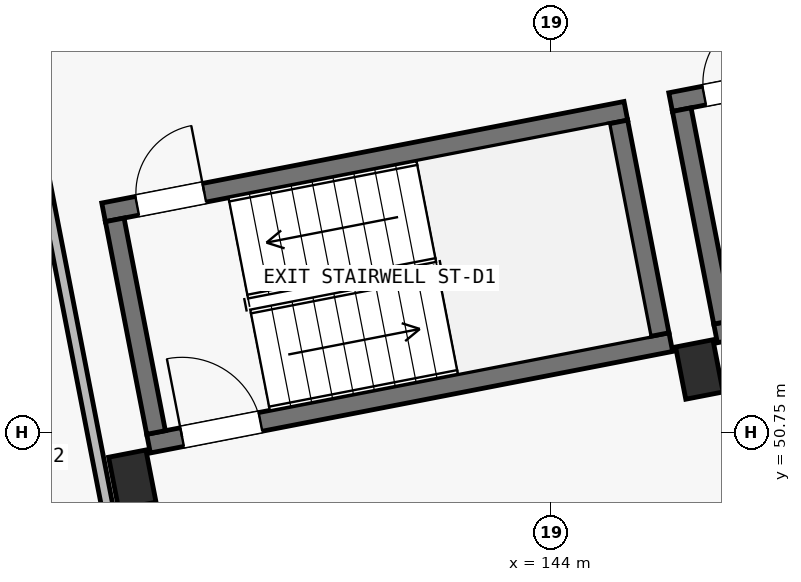
"""IFC4 building model, lengths in metres.
Left out: names, types, materials, properties, quantities, classifications, styles, units other than length and angle.
Written with IfcOpenShell. Run it as: python <this file> out.ifc"""

import sys

from ifc_helpers import new_model, si_unit, direction, frame, frame_2d, origin, origin_2d, place, context, subcontext, project, spatial, rectangle, extrude, element, fill, save


model = new_model("IFC4")
c1 = context("Model", 3, precision=1e-05, world=origin(), true_north=direction((0.0, 1.0)))
c2 = subcontext(c1, "Body", "Model", "MODEL_VIEW")
j1 = project(units=[si_unit("LENGTHUNIT", "METRE"), si_unit("PLANEANGLEUNIT", "RADIAN")], contexts=[c1])
p1 = place(None, origin())
s1 = spatial("IfcSite", under=j1, at=p1, CompositionType="ELEMENT")
p2 = place(p1, origin())
s2 = spatial("IfcBuilding", under=s1, at=p2, CompositionType="ELEMENT")
p3 = place(p2, frame((0.0, 0.0, 8.4)))
s3 = spatial("IfcBuildingStorey", under=s2, at=p3, CompositionType="ELEMENT", Elevation=8.4)
for number, where, z_axis, x_axis in (
    (1, (138.491, 50.13, 0.0), (0.0, 0.0, 1.0), (0.982, 0.191, 0.0)),
    (2, (145.952, 51.58, 0.0), (0.0, 0.0, 1.0), (0.982, 0.191, 0.0)),
):
    element("IfcColumn", number, at=place(p3, frame(where, z_axis=z_axis, x_axis=x_axis)), inside=s3, PredefinedType="COLUMN", context=c2, shape_type="SweptSolid", body=[
        extrude(rectangle(XDim=0.5, YDim=0.7, at=origin_2d()), origin(), (0.0, 0.0, 1.0), 3.25),
    ])
p4 = place(p3, frame((138.113, 53.647, 0.0), z_axis=(0.0, 0.0, 1.0), x_axis=(0.981626097708, 0.19081458094, 0.0)))
e3 = element("IfcWall", 3, at=p4, inside=s3, PredefinedType="SHEAR", context=c2, shape_type="SweptSolid", body=[
    extrude(rectangle(XDim=7.0, YDim=0.25, at=frame_2d((3.5, 0.0))), origin(), (0.0, 0.0, 1.0), 3.25),
])
p5 = place(p4, frame((0.45, 0.0, 0.0)))
e4 = element("IfcOpeningElement", 4, at=p5, cuts=e3, PredefinedType="OPENING", context=c2, shape_type="SweptSolid", body=[
    extrude(rectangle(XDim=0.9, YDim=2.1, at=frame_2d((0.45, 1.05))), frame((0.0, 0.14, 0.0), z_axis=(0.0, -1.0, 0.0), x_axis=(1.0, 0.0, 0.0)), (0.0, 0.0, 1.0), 0.28),
])
p6 = place(p3, frame((138.705, 50.604, 0.0), z_axis=(0.0, 0.0, 1.0), x_axis=(0.981626097708, 0.19081458094, 0.0)))
e5 = element("IfcWall", 5, at=p6, inside=s3, PredefinedType="SHEAR", context=c2, shape_type="SweptSolid", body=[
    extrude(rectangle(XDim=7.0, YDim=0.25, at=frame_2d((3.5, 0.0))), origin(), (0.0, 0.0, 1.0), 3.25),
])
p7 = place(p6, frame((0.45, 0.0, 0.0)))
e6 = element("IfcOpeningElement", 6, at=p7, cuts=e5, PredefinedType="OPENING", context=c2, shape_type="SweptSolid", body=[
    extrude(rectangle(XDim=1.05, YDim=2.15, at=frame_2d((0.525, 1.075))), frame((0.0, 0.14, 0.0), z_axis=(0.0, -1.0, 0.0), x_axis=(1.0, 0.0, 0.0)), (0.0, 0.0, 1.0), 0.28),
])
p8 = place(p3, frame((138.804, 50.751, 0.0), z_axis=(0.0, 0.0, 1.0), x_axis=(-0.190858194834, 0.981617618762, 0.0)))
e7 = element("IfcWall", 7, at=p8, inside=s3, PredefinedType="SHEAR", context=c2, shape_type="SweptSolid", body=[
    extrude(rectangle(XDim=2.85, YDim=0.25, at=frame_2d((1.425, 0.0))), origin(), (0.0, 0.0, 1.0), 3.25),
])
p9 = place(p3, frame((145.43, 52.039, 0.0), z_axis=(0.0, 0.0, 1.0), x_axis=(-0.190842147128, 0.981620738819, 0.0)))
e8 = element("IfcWall", 8, at=p9, inside=s3, PredefinedType="SHEAR", context=c2, shape_type="SweptSolid", body=[
    extrude(rectangle(XDim=2.85, YDim=0.25, at=frame_2d((1.425, 0.0))), origin(), (0.0, 0.0, 1.0), 3.25),
])
p10 = place(p3, frame((145.574, 55.098, 0.0), z_axis=(0.0, 0.0, 1.0), x_axis=(0.981626097708, 0.19081458094, 0.0)))
e9 = element("IfcWall", 9, at=p10, inside=s3, PredefinedType="SHEAR", context=c2, shape_type="SweptSolid", body=[
    extrude(rectangle(XDim=7.0, YDim=0.25, at=frame_2d((3.5, 0.0))), origin(), (0.0, 0.0, 1.0), 3.25),
])
p11 = place(p10, frame((0.45, 0.0, 0.0)))
e10 = element("IfcOpeningElement", 10, at=p11, cuts=e9, PredefinedType="OPENING", context=c2, shape_type="SweptSolid", body=[
    extrude(rectangle(XDim=0.9, YDim=2.1, at=frame_2d((0.45, 1.05))), frame((0.0, 0.14, 0.0), z_axis=(0.0, -1.0, 0.0), x_axis=(1.0, 0.0, 0.0)), (0.0, 0.0, 1.0), 0.28),
])
p12 = place(p3, frame((146.165, 52.054, 0.0), z_axis=(0.0, 0.0, 1.0), x_axis=(0.981627367538, 0.190808048312, 0.0)))
e11 = element("IfcWall", 11, at=p12, inside=s3, PredefinedType="SHEAR", context=c2, shape_type="SweptSolid", body=[
    extrude(rectangle(XDim=7.0, YDim=0.25, at=frame_2d((3.5, 0.0))), origin(), (0.0, 0.0, 1.0), 3.25),
])
p13 = place(p12, frame((0.45, 0.0, 0.0)))
e12 = element("IfcOpeningElement", 12, at=p13, cuts=e11, PredefinedType="OPENING", context=c2, shape_type="SweptSolid", body=[
    extrude(rectangle(XDim=1.05, YDim=2.15, at=frame_2d((0.525, 1.075))), frame((0.0, 0.14, 0.0), z_axis=(0.0, -1.0, 0.0), x_axis=(1.0, 0.0, 0.0)), (0.0, 0.0, 1.0), 0.28),
])
p14 = place(p3, frame((146.264, 52.201, 0.0), z_axis=(0.0, 0.0, 1.0), x_axis=(-0.190775649797, 0.981633664584, 0.0)))
e13 = element("IfcWall", 13, at=p14, inside=s3, PredefinedType="SHEAR", context=c2, shape_type="SweptSolid", body=[
    extrude(rectangle(XDim=2.85, YDim=0.25, at=frame_2d((1.425, 0.0))), origin(), (0.0, 0.0, 1.0), 3.25),
])
p15 = place(p3, frame((138.467, 48.21, 0.0), z_axis=(0.0, 0.0, 1.0), x_axis=(-0.190814044018, 0.981626202078, 0.0)))
e14 = element("IfcWall", 14, at=p15, inside=s3, PredefinedType="PARTITIONING", context=c2, shape_type="SweptSolid", body=[
    extrude(rectangle(XDim=9.87, YDim=0.15, at=frame_2d((4.935, 0.0))), origin(), (0.0, 0.0, 1.0), 2.97),
])
p16 = place(p7, origin())
e15 = element("IfcDoor", 15, at=p16, inside=s3, OperationType="SINGLE_SWING_LEFT", PredefinedType="DOOR", context=c2, shape_type="SweptSolid", body=[
    extrude(rectangle(XDim=1.05, YDim=2.15, at=frame_2d((0.525, 1.075))), frame((0.0, 0.025, 0.0), z_axis=(0.0, -1.0, 0.0), x_axis=(1.0, 0.0, 0.0)), (0.0, 0.0, 1.0), 0.05),
])
fill(e6, e15)
p17 = place(p5, origin())
e16 = element("IfcDoor", 16, at=p17, inside=s3, OperationType="SINGLE_SWING_RIGHT", PredefinedType="DOOR", context=c2, shape_type="SweptSolid", body=[
    extrude(rectangle(XDim=0.9, YDim=2.1, at=frame_2d((0.45, 1.05))), frame((0.0, 0.025, 0.0), z_axis=(0.0, -1.0, 0.0), x_axis=(1.0, 0.0, 0.0)), (0.0, 0.0, 1.0), 0.05),
])
fill(e4, e16)
p18 = place(p11, origin())
e17 = element("IfcDoor", 17, at=p18, inside=s3, OperationType="SINGLE_SWING_RIGHT", PredefinedType="DOOR", context=c2, shape_type="SweptSolid", body=[
    extrude(rectangle(XDim=0.9, YDim=2.1, at=frame_2d((0.45, 1.05))), frame((0.0, 0.025, 0.0), z_axis=(0.0, -1.0, 0.0), x_axis=(1.0, 0.0, 0.0)), (0.0, 0.0, 1.0), 0.05),
])
fill(e10, e17)
save(model, sys.argv[1])
